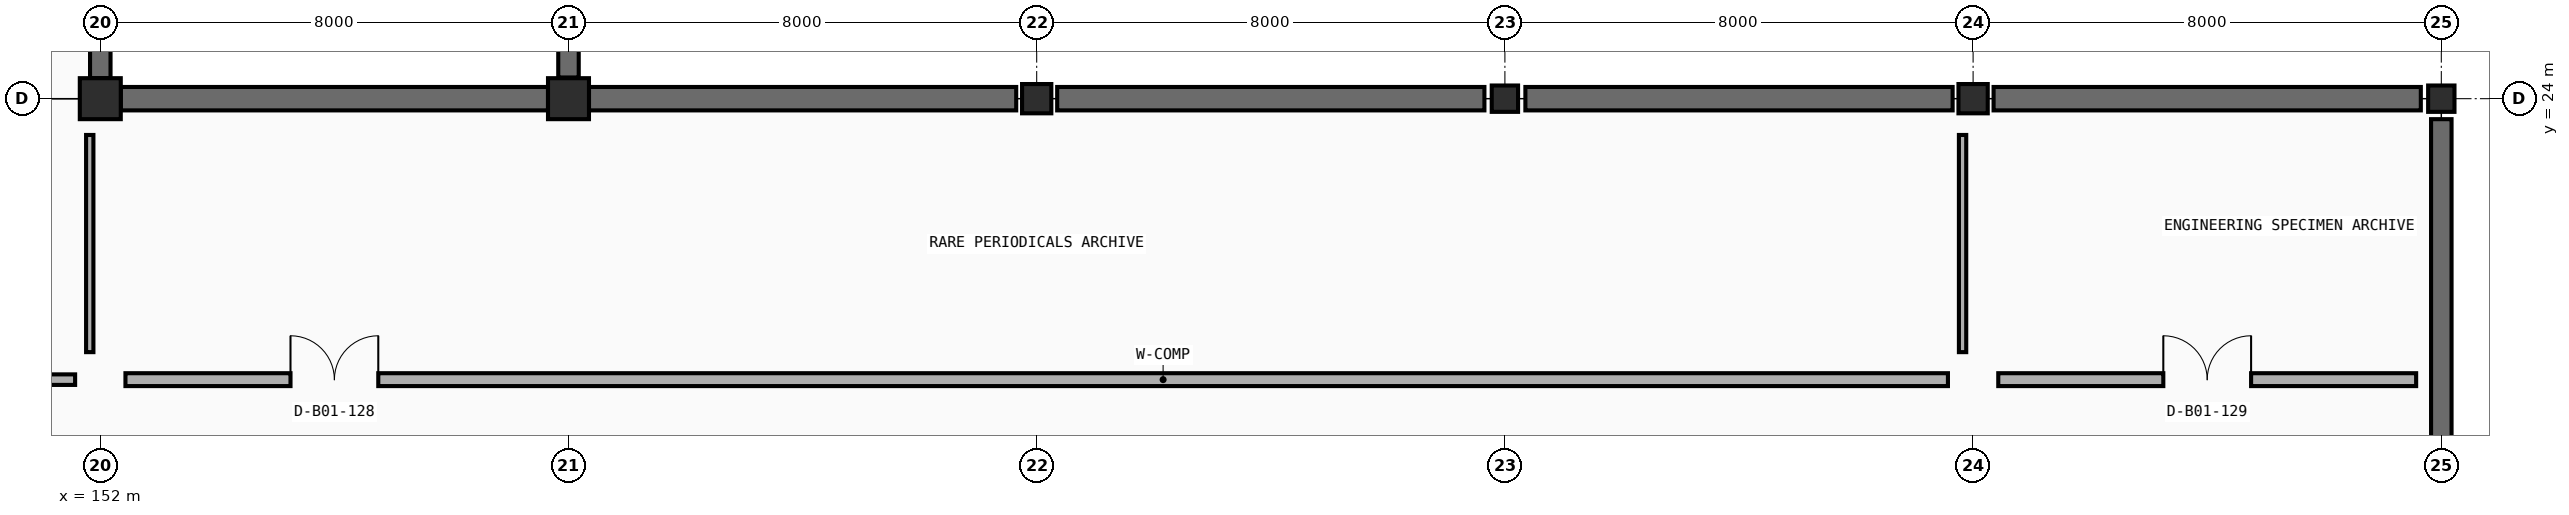
"""IFC4 building model, lengths in metres.
Left out: names, types, materials, properties, quantities, classifications, styles, units other than length and angle.
Written with IfcOpenShell. Run it as: python <this file> out.ifc"""

import sys

from ifc_helpers import new_model, si_unit, direction, frame, frame_2d, origin, origin_2d, place, context, subcontext, project, spatial, rectangle, extrude, element, fill, save


model = new_model("IFC4")
c1 = context("Model", 3, precision=1e-05, world=origin(), true_north=direction((0.0, 1.0)))
c2 = subcontext(c1, "Body", "Model", "MODEL_VIEW")
j1 = project(units=[si_unit("LENGTHUNIT", "METRE"), si_unit("PLANEANGLEUNIT", "RADIAN")], contexts=[c1])
p1 = place(None, origin())
s1 = spatial("IfcSite", under=j1, at=p1, CompositionType="ELEMENT")
p2 = place(p1, origin())
s2 = spatial("IfcBuilding", under=s1, at=p2, CompositionType="ELEMENT")
p3 = place(p2, frame((0.0, 0.0, -4.5)))
s3 = spatial("IfcBuildingStorey", under=s2, at=p3, CompositionType="ELEMENT", Elevation=-4.5)
for number, where, z_axis, x_axis in (
    (1, (152.0, 24.0, -0.405), (0.0, 0.0, 1.0), (1.0, 0.0, 0.0)),
    (2, (160.0, 24.0, -0.405), (0.0, 0.0, 1.0), (1.0, 0.0, 0.0)),
):
    element("IfcColumn", number, at=place(p3, frame(where, z_axis=z_axis, x_axis=x_axis)), inside=s3, PredefinedType="COLUMN", context=c2, shape_type="SweptSolid", body=[
        extrude(rectangle(XDim=0.7, YDim=0.7, at=origin_2d()), origin(), (0.0, 0.0, 1.0), 4.905),
    ])
p4 = place(p3, frame((168.0, 24.0, -0.405), z_axis=(0.0, 0.0, 1.0), x_axis=(1.0, 0.0, 0.0)))
e3 = element("IfcColumn", 3, at=p4, inside=s3, PredefinedType="COLUMN", context=c2, shape_type="SweptSolid", body=[
    extrude(rectangle(XDim=0.5, YDim=0.5, at=origin_2d()), origin(), (0.0, 0.0, 1.0), 4.905),
])
p5 = place(p3, frame((176.0, 24.0, -0.405), z_axis=(0.0, 0.0, 1.0), x_axis=(1.0, 0.0, 0.0)))
e4 = element("IfcColumn", 4, at=p5, inside=s3, PredefinedType="COLUMN", context=c2, shape_type="SweptSolid", body=[
    extrude(rectangle(XDim=0.45, YDim=0.45, at=origin_2d()), origin(), (0.0, 0.0, 1.0), 4.905),
])
p6 = place(p3, frame((184.0, 24.0, -0.405), z_axis=(0.0, 0.0, 1.0), x_axis=(1.0, 0.0, 0.0)))
e5 = element("IfcColumn", 5, at=p6, inside=s3, PredefinedType="COLUMN", context=c2, shape_type="SweptSolid", body=[
    extrude(rectangle(XDim=0.5, YDim=0.5, at=origin_2d()), origin(), (0.0, 0.0, 1.0), 4.905),
])
p7 = place(p3, frame((192.0, 24.0, -0.405), z_axis=(0.0, 0.0, 1.0), x_axis=(1.0, 0.0, 0.0)))
e6 = element("IfcColumn", 6, at=p7, inside=s3, PredefinedType="COLUMN", context=c2, shape_type="SweptSolid", body=[
    extrude(rectangle(XDim=0.45, YDim=0.45, at=origin_2d()), origin(), (0.0, 0.0, 1.0), 4.905),
])
for number, where, z_axis, x_axis in (
    (7, (152.35, 24.0, 0.0), (0.0, 0.0, 1.0), (1.0, 0.0, 0.0)),
    (8, (160.35, 24.0, 0.0), (0.0, 0.0, 1.0), (1.0, 0.0, 0.0)),
    (9, (168.35, 24.0, 0.0), (0.0, 0.0, 1.0), (1.0, 0.0, 0.0)),
    (10, (176.35, 24.0, 0.0), (0.0, 0.0, 1.0), (1.0, 0.0, 0.0)),
    (11, (184.35, 24.0, 0.0), (0.0, 0.0, 1.0), (1.0, 0.0, 0.0)),
):
    element("IfcWall", number, at=place(p3, frame(where, z_axis=z_axis, x_axis=x_axis)), inside=s3, PredefinedType="USERDEFINED", context=c2, shape_type="SweptSolid", body=[
        extrude(rectangle(XDim=7.3, YDim=0.4, at=frame_2d((3.65, 0.0))), origin(), (0.0, 0.0, 1.0), 4.095),
    ])
for number, where, z_axis, x_axis in (
    (12, (192.0, 23.65, 0.0), (0.0, 0.0, 1.0), (0.0, -1.0, 0.0)),
    (13, (152.0, 31.65, 0.0), (0.0, 0.0, 1.0), (0.0, -1.0, 0.0)),
):
    element("IfcWall", number, at=place(p3, frame(where, z_axis=z_axis, x_axis=x_axis)), inside=s3, PredefinedType="USERDEFINED", context=c2, shape_type="SweptSolid", body=[
        extrude(rectangle(XDim=7.3, YDim=0.35, at=frame_2d((3.65, 0.0))), origin(), (0.0, 0.0, 1.0), 4.095),
    ])
p8 = place(p3, frame((160.0, 24.362, -0.405), z_axis=(0.0, 0.0, 1.0), x_axis=(0.0, 1.0, 0.0)))
e14 = element("IfcWall", 14, at=p8, inside=s3, PredefinedType="USERDEFINED", context=c2, shape_type="SweptSolid", body=[
    extrude(rectangle(XDim=7.251, YDim=0.35, at=frame_2d((3.625, 0.0))), origin(), (0.0, 0.0, 1.0), 4.495),
])
p9 = place(p3, frame((120.43, 19.2, 0.0), z_axis=(0.0, 0.0, 1.0), x_axis=(1.0, 0.0, 0.0)))
e15 = element("IfcWall", 15, at=p9, inside=s3, PredefinedType="PARTITIONING", context=c2, shape_type="SweptSolid", body=[
    extrude(rectangle(XDim=31.14, YDim=0.18, at=frame_2d((15.57, 0.0))), origin(), (0.0, 0.0, 1.0), 3.6),
])
p10 = place(p9, frame((3.07, 0.0, 0.0)))
e16 = element("IfcOpeningElement", 16, at=p10, cuts=e15, PredefinedType="OPENING", context=c2, shape_type="SweptSolid", body=[
    extrude(rectangle(XDim=1.0, YDim=2.15, at=frame_2d((0.5, 1.075))), frame((0.0, 0.1, 0.0), z_axis=(0.0, -1.0, 0.0), x_axis=(1.0, 0.0, 0.0)), (0.0, 0.0, 1.0), 0.2),
])
p11 = place(p3, frame((151.82, 19.67, 0.0), z_axis=(0.0, 0.0, 1.0), x_axis=(0.0, 1.0, 0.0)))
e17 = element("IfcWall", 17, at=p11, inside=s3, PredefinedType="PARTITIONING", context=c2, shape_type="SweptSolid", body=[
    extrude(rectangle(XDim=3.71, YDim=0.125, at=frame_2d((1.855, 0.0))), origin(), (0.0, 0.0, 1.0), 3.27),
])
p12 = place(p3, frame((152.43, 19.2, 0.0), z_axis=(0.0, 0.0, 1.0), x_axis=(1.0, 0.0, 0.0)))
e18 = element("IfcWall", 18, at=p12, inside=s3, PredefinedType="PARTITIONING", context=c2, shape_type="SweptSolid", body=[
    extrude(rectangle(XDim=31.14, YDim=0.22, at=frame_2d((15.57, 0.0))), origin(), (0.0, 0.0, 1.0), 3.6),
])
p13 = place(p12, frame((2.82, 0.0, 0.0)))
e19 = element("IfcOpeningElement", 19, at=p13, cuts=e18, PredefinedType="OPENING", context=c2, shape_type="SweptSolid", body=[
    extrude(rectangle(XDim=1.5, YDim=2.2, at=frame_2d((0.75, 1.1))), frame((0.0, 0.12, 0.0), z_axis=(0.0, -1.0, 0.0), x_axis=(1.0, 0.0, 0.0)), (0.0, 0.0, 1.0), 0.24),
])
p14 = place(p3, frame((183.82, 19.67, 0.0), z_axis=(0.0, 0.0, 1.0), x_axis=(0.0, 1.0, 0.0)))
e20 = element("IfcWall", 20, at=p14, inside=s3, PredefinedType="PARTITIONING", context=c2, shape_type="SweptSolid", body=[
    extrude(rectangle(XDim=3.71, YDim=0.125, at=frame_2d((1.855, 0.0))), origin(), (0.0, 0.0, 1.0), 3.387),
])
p15 = place(p3, frame((184.43, 19.2, 0.0), z_axis=(0.0, 0.0, 1.0), x_axis=(1.0, 0.0, 0.0)))
e21 = element("IfcWall", 21, at=p15, inside=s3, PredefinedType="PARTITIONING", context=c2, shape_type="SweptSolid", body=[
    extrude(rectangle(XDim=7.14, YDim=0.22, at=frame_2d((3.57, 0.0))), origin(), (0.0, 0.0, 1.0), 3.6),
])
p16 = place(p15, frame((2.82, 0.0, 0.0)))
e22 = element("IfcOpeningElement", 22, at=p16, cuts=e21, PredefinedType="OPENING", context=c2, shape_type="SweptSolid", body=[
    extrude(rectangle(XDim=1.5, YDim=2.2, at=frame_2d((0.75, 1.1))), frame((0.0, 0.12, 0.0), z_axis=(0.0, -1.0, 0.0), x_axis=(1.0, 0.0, 0.0)), (0.0, 0.0, 1.0), 0.24),
])
p17 = place(p13, origin())
e23 = element("IfcDoor", 23, at=p17, inside=s3, OperationType="DOUBLE_DOOR_SINGLE_SWING", PredefinedType="DOOR", context=c2, shape_type="SweptSolid", body=[
    extrude(rectangle(XDim=1.5, YDim=2.2, at=frame_2d((0.75, 1.1))), frame((0.0, 0.025, 0.0), z_axis=(0.0, -1.0, 0.0), x_axis=(1.0, 0.0, 0.0)), (0.0, 0.0, 1.0), 0.05),
])
fill(e19, e23)
p18 = place(p16, origin())
e24 = element("IfcDoor", 24, at=p18, inside=s3, OperationType="DOUBLE_DOOR_SINGLE_SWING", PredefinedType="DOOR", context=c2, shape_type="SweptSolid", body=[
    extrude(rectangle(XDim=1.5, YDim=2.2, at=frame_2d((0.75, 1.1))), frame((0.0, 0.025, 0.0), z_axis=(0.0, -1.0, 0.0), x_axis=(1.0, 0.0, 0.0)), (0.0, 0.0, 1.0), 0.05),
])
fill(e22, e24)
save(model, sys.argv[1])
